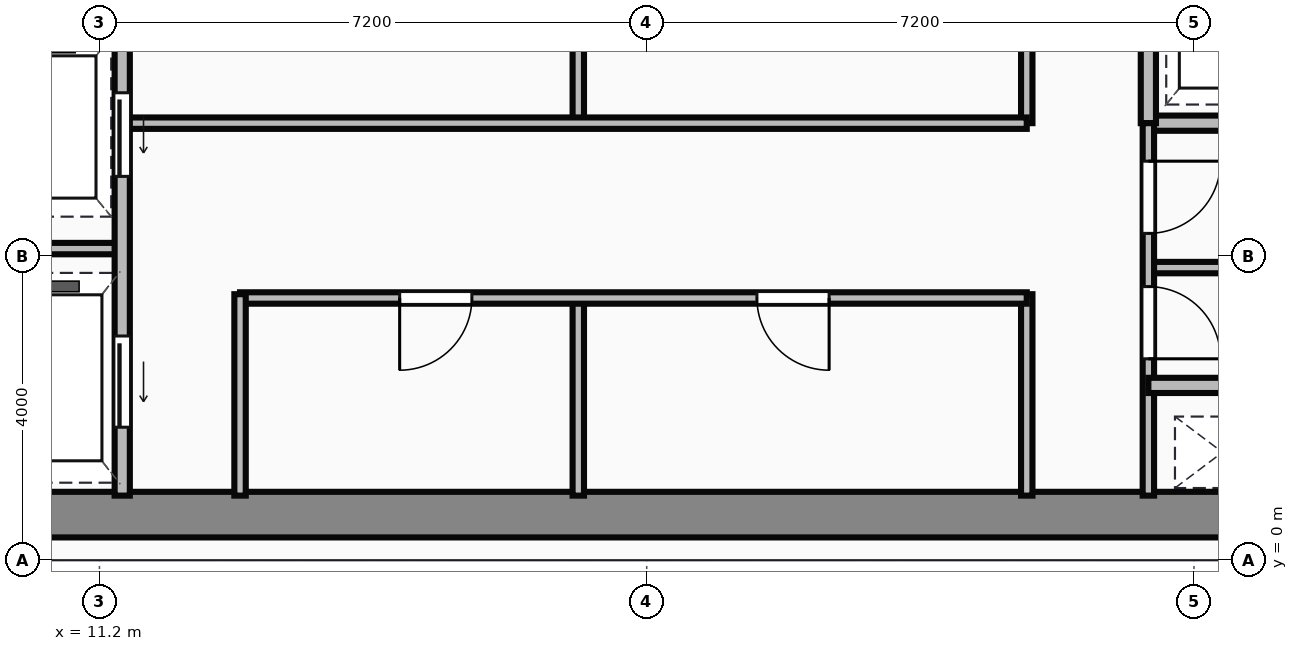
"""IFC4 building model, lengths in metres.
Left out: names, types, materials, properties, quantities, classifications, styles, units other than length and angle.
Written with IfcOpenShell. Run it as: python <this file> out.ifc"""

import sys

from ifc_helpers import new_model, si_unit, direction, frame, frame_2d, origin, place, context, subcontext, project, spatial, rectangle, extrude, source, transform, mapped, element, fill, save


model = new_model("IFC4")
c1 = context("Model", 3, precision=1e-05, world=origin(), true_north=direction((0.0, 1.0)))
c2 = subcontext(c1, "Body", "Model", "MODEL_VIEW")
j1 = project(units=[si_unit("LENGTHUNIT", "METRE"), si_unit("PLANEANGLEUNIT", "RADIAN")], contexts=[c1])
p1 = place(None, origin())
s1 = spatial("IfcSite", under=j1, at=p1, CompositionType="ELEMENT")
p2 = place(p1, origin())
s2 = spatial("IfcBuilding", under=s1, at=p2, CompositionType="ELEMENT")
p3 = place(p2, frame((0.0, 0.0, 266.1)))
s3 = spatial("IfcBuildingStorey", under=s2, at=p3, CompositionType="ELEMENT", Elevation=266.1)
m1 = source(origin(), c2, "Body", "SweptSolid", [
    extrude(rectangle(XDim=29.5, YDim=0.6, at=frame_2d((14.75, 0.0))), origin(), (0.0, 0.0, 1.0), 3.65),
])
p4 = place(p3, frame((4.5, 0.6, 0.0), z_axis=(0.0, 0.0, 1.0), x_axis=(1.0, 0.0, 0.0)))
e1 = element("IfcWall", 1, at=p4, inside=s3, PredefinedType="SHEAR", context=c2, shape_type="MappedRepresentation", body=[
    mapped(m1, transform((0.0, 0.0, 0.0))),
])
m2 = source(origin(), c2, "Body", "SweptSolid", [
    extrude(rectangle(XDim=9.6, YDim=0.2, at=frame_2d((4.8, 0.0))), origin(), (0.0, 0.0, 1.0), 3.4),
])
p5 = place(p3, frame((11.5, 0.85, 0.0), z_axis=(0.0, 0.0, 1.0), x_axis=(0.0, 1.0, 0.0)))
e2 = element("IfcWall", 2, at=p5, inside=s3, PredefinedType="PARTITIONING", context=c2, shape_type="MappedRepresentation", body=[
    mapped(m2, transform((0.0, 0.0, 0.0))),
])
p6 = place(p5, frame((4.2, 0.0, 0.0)))
e3 = element("IfcOpeningElement", 3, at=p6, cuts=e2, PredefinedType="OPENING", context=c2, shape_type="SweptSolid", body=[
    extrude(rectangle(XDim=1.1, YDim=2.15, at=frame_2d((0.55, 1.075))), frame((0.0, 0.11, 0.0), z_axis=(0.0, -1.0, 0.0), x_axis=(1.0, 0.0, 0.0)), (0.0, 0.0, 1.0), 0.22),
])
p7 = place(p5, frame((0.9, 0.0, 0.0)))
e4 = element("IfcOpeningElement", 4, at=p7, cuts=e2, PredefinedType="OPENING", context=c2, shape_type="SweptSolid", body=[
    extrude(rectangle(XDim=1.2, YDim=2.15, at=frame_2d((0.6, 1.075))), frame((0.0, 0.11, 0.0), z_axis=(0.0, -1.0, 0.0), x_axis=(1.0, 0.0, 0.0)), (0.0, 0.0, 1.0), 0.22),
])
m3 = source(origin(), c2, "Body", "SweptSolid", [
    extrude(rectangle(XDim=2.4, YDim=0.15, at=frame_2d((1.2, 0.0))), origin(), (0.0, 0.0, 1.0), 3.4),
])
p8 = place(p3, frame((9.1, 4.1, 0.0), z_axis=(0.0, 0.0, 1.0), x_axis=(1.0, 0.0, 0.0)))
e5 = element("IfcWall", 5, at=p8, inside=s3, PredefinedType="PARTITIONING", context=c2, shape_type="MappedRepresentation", body=[
    mapped(m3, transform((0.0, 0.0, 0.0))),
])
m4 = source(origin(), c2, "Body", "SweptSolid", [
    extrude(rectangle(XDim=2.65, YDim=0.15, at=frame_2d((1.325, 0.0))), origin(), (0.0, 0.0, 1.0), 3.4),
])
p9 = place(p3, frame((13.05, 0.85, 0.0), z_axis=(0.0, 0.0, 1.0), x_axis=(0.0, 1.0, 0.0)))
e6 = element("IfcWall", 6, at=p9, inside=s3, PredefinedType="PARTITIONING", context=c2, shape_type="MappedRepresentation", body=[
    mapped(m4, transform((0.0, 0.0, 0.0))),
])
m5 = source(origin(), c2, "Body", "SweptSolid", [
    extrude(rectangle(XDim=10.35, YDim=0.15, at=frame_2d((5.175, 0.0))), origin(), (0.0, 0.0, 1.0), 3.4),
])
p10 = place(p3, frame((13.05, 3.45, 0.0), z_axis=(0.0, 0.0, 1.0), x_axis=(1.0, 0.0, 0.0)))
e7 = element("IfcWall", 7, at=p10, inside=s3, PredefinedType="PARTITIONING", context=c2, shape_type="MappedRepresentation", body=[
    mapped(m5, transform((0.0, 0.0, 0.0))),
])
p11 = place(p10, frame((2.1, 0.0, 0.0)))
e8 = element("IfcOpeningElement", 8, at=p11, cuts=e7, PredefinedType="OPENING", context=c2, shape_type="SweptSolid", body=[
    extrude(rectangle(XDim=0.95, YDim=2.15, at=frame_2d((0.475, 1.075))), frame((0.0, 0.085, 0.0), z_axis=(0.0, -1.0, 0.0), x_axis=(1.0, 0.0, 0.0)), (0.0, 0.0, 1.0), 0.17),
])
p12 = place(p10, frame((6.8, 0.0, 0.0)))
e9 = element("IfcOpeningElement", 9, at=p12, cuts=e7, PredefinedType="OPENING", context=c2, shape_type="SweptSolid", body=[
    extrude(rectangle(XDim=0.95, YDim=2.15, at=frame_2d((0.475, 1.075))), frame((0.0, 0.085, 0.0), z_axis=(0.0, -1.0, 0.0), x_axis=(1.0, 0.0, 0.0)), (0.0, 0.0, 1.0), 0.17),
])
p13 = place(p3, frame((23.4, 0.85, 0.0), z_axis=(0.0, 0.0, 1.0), x_axis=(0.0, 1.0, 0.0)))
e10 = element("IfcWall", 10, at=p13, inside=s3, PredefinedType="PARTITIONING", context=c2, shape_type="MappedRepresentation", body=[
    mapped(m4, transform((0.0, 0.0, 0.0))),
])
m6 = source(origin(), c2, "Body", "SweptSolid", [
    extrude(rectangle(XDim=2.6, YDim=0.15, at=frame_2d((1.3, 0.0))), origin(), (0.0, 0.0, 1.0), 3.4),
])
p14 = place(p3, frame((17.5, 0.85, 0.0), z_axis=(0.0, 0.0, 1.0), x_axis=(0.0, 1.0, 0.0)))
e11 = element("IfcWall", 11, at=p14, inside=s3, PredefinedType="PARTITIONING", context=c2, shape_type="MappedRepresentation", body=[
    mapped(m6, transform((0.0, 0.0, 0.0))),
])
m7 = source(origin(), c2, "Body", "SweptSolid", [
    extrude(rectangle(XDim=11.85, YDim=0.15, at=frame_2d((5.925, 0.0))), origin(), (0.0, 0.0, 1.0), 3.4),
])
p15 = place(p3, frame((11.55, 5.75, 0.0), z_axis=(0.0, 0.0, 1.0), x_axis=(1.0, 0.0, 0.0)))
e12 = element("IfcWall", 12, at=p15, inside=s3, PredefinedType="PARTITIONING", context=c2, shape_type="MappedRepresentation", body=[
    mapped(m7, transform((0.0, 0.0, 0.0))),
])
m8 = source(origin(), c2, "Body", "SweptSolid", [
    extrude(rectangle(XDim=2.6, YDim=0.15, at=frame_2d((1.3, 0.0))), origin(), (0.0, 0.0, 1.0), 3.4),
])
p16 = place(p3, frame((23.4, 5.75, 0.0), z_axis=(0.0, 0.0, 1.0), x_axis=(0.0, 1.0, 0.0)))
e13 = element("IfcWall", 13, at=p16, inside=s3, PredefinedType="PARTITIONING", context=c2, shape_type="MappedRepresentation", body=[
    mapped(m8, transform((0.0, 0.0, 0.0))),
])
m9 = source(origin(), c2, "Body", "SweptSolid", [
    extrude(rectangle(XDim=2.5, YDim=0.15, at=frame_2d((1.25, 0.0))), origin(), (0.0, 0.0, 1.0), 3.4),
])
p17 = place(p3, frame((17.5, 5.8, 0.0), z_axis=(0.0, 0.0, 1.0), x_axis=(0.0, 1.0, 0.0)))
e14 = element("IfcWall", 14, at=p17, inside=s3, PredefinedType="PARTITIONING", context=c2, shape_type="MappedRepresentation", body=[
    mapped(m9, transform((0.0, 0.0, 0.0))),
])
m10 = source(origin(), c2, "Body", "SweptSolid", [
    extrude(rectangle(XDim=4.55, YDim=0.2, at=frame_2d((2.275, 0.0))), origin(), (0.0, 0.0, 1.0), 3.4),
])
p18 = place(p3, frame((25.0, 5.75, 0.0), z_axis=(0.0, 0.0, 1.0), x_axis=(1.0, 0.0, 0.0)))
e15 = element("IfcWall", 15, at=p18, inside=s3, PredefinedType="PARTITIONING", context=c2, shape_type="MappedRepresentation", body=[
    mapped(m10, transform((0.0, 0.0, 0.0))),
])
m11 = source(origin(), c2, "Body", "SweptSolid", [
    extrude(rectangle(XDim=2.6, YDim=0.2, at=frame_2d((1.3, 0.0))), origin(), (0.0, 0.0, 1.0), 3.4),
])
p19 = place(p3, frame((25.0, 5.75, 0.0), z_axis=(0.0, 0.0, 1.0), x_axis=(0.0, 1.0, 0.0)))
e16 = element("IfcWall", 16, at=p19, inside=s3, PredefinedType="PARTITIONING", context=c2, shape_type="MappedRepresentation", body=[
    mapped(m11, transform((0.0, 0.0, 0.0))),
])
m12 = source(origin(), c2, "Body", "SweptSolid", [
    extrude(rectangle(XDim=4.9, YDim=0.15, at=frame_2d((2.45, 0.0))), origin(), (0.0, 0.0, 1.0), 3.4),
])
p20 = place(p3, frame((25.0, 0.85, 0.0), z_axis=(0.0, 0.0, 1.0), x_axis=(0.0, 1.0, 0.0)))
e17 = element("IfcWall", 17, at=p20, inside=s3, PredefinedType="PARTITIONING", context=c2, shape_type="MappedRepresentation", body=[
    mapped(m12, transform((0.0, 0.0, 0.0))),
])
p21 = place(p20, frame((1.8, 0.0, 0.0)))
e18 = element("IfcOpeningElement", 18, at=p21, cuts=e17, PredefinedType="OPENING", context=c2, shape_type="SweptSolid", body=[
    extrude(rectangle(XDim=0.95, YDim=2.15, at=frame_2d((0.475, 1.075))), frame((0.0, 0.085, 0.0), z_axis=(0.0, -1.0, 0.0), x_axis=(1.0, 0.0, 0.0)), (0.0, 0.0, 1.0), 0.17),
])
p22 = place(p20, frame((3.45, 0.0, 0.0)))
e19 = element("IfcOpeningElement", 19, at=p22, cuts=e17, PredefinedType="OPENING", context=c2, shape_type="SweptSolid", body=[
    extrude(rectangle(XDim=0.95, YDim=2.15, at=frame_2d((0.475, 1.075))), frame((0.0, 0.085, 0.0), z_axis=(0.0, -1.0, 0.0), x_axis=(1.0, 0.0, 0.0)), (0.0, 0.0, 1.0), 0.17),
])
m13 = source(origin(), c2, "Body", "SweptSolid", [
    extrude(rectangle(XDim=2.4, YDim=0.2, at=frame_2d((1.2, 0.0))), origin(), (0.0, 0.0, 1.0), 3.4),
])
p23 = place(p3, frame((25.0, 2.3, 0.0), z_axis=(0.0, 0.0, 1.0), x_axis=(1.0, 0.0, 0.0)))
e20 = element("IfcWall", 20, at=p23, inside=s3, PredefinedType="PARTITIONING", context=c2, shape_type="MappedRepresentation", body=[
    mapped(m13, transform((0.0, 0.0, 0.0))),
])
m14 = source(origin(), c2, "Body", "SweptSolid", [
    extrude(rectangle(XDim=4.55, YDim=0.15, at=frame_2d((2.275, 0.0))), origin(), (0.0, 0.0, 1.0), 3.4),
])
p24 = place(p3, frame((25.0, 3.85, 0.0), z_axis=(0.0, 0.0, 1.0), x_axis=(1.0, 0.0, 0.0)))
e21 = element("IfcWall", 21, at=p24, inside=s3, PredefinedType="PARTITIONING", context=c2, shape_type="MappedRepresentation", body=[
    mapped(m14, transform((0.0, 0.0, 0.0))),
])
m15 = source(origin(), c2, "Body", "SweptSolid", [
    extrude(rectangle(XDim=1.1, YDim=2.15, at=frame_2d((0.55, 1.075))), frame((0.0, 0.025, 0.0), z_axis=(0.0, -1.0, 0.0), x_axis=(1.0, 0.0, 0.0)), (0.0, 0.0, 1.0), 0.05),
])
p25 = place(p6, frame((1.1, 0.0, 0.0), z_axis=(0.0, 0.0, 1.0), x_axis=(-1.0, 0.0, 0.0)))
e22 = element("IfcDoor", 22, at=p25, inside=s3, OperationType="SLIDING_TO_LEFT", PredefinedType="DOOR", context=c2, shape_type="MappedRepresentation", body=[
    mapped(m15, transform((0.0, 0.0, 0.0))),
])
fill(e3, e22)
m16 = source(origin(), c2, "Body", "SweptSolid", [
    extrude(rectangle(XDim=1.2, YDim=2.15, at=frame_2d((0.6, 1.075))), frame((0.0, 0.025, 0.0), z_axis=(0.0, -1.0, 0.0), x_axis=(1.0, 0.0, 0.0)), (0.0, 0.0, 1.0), 0.05),
])
p26 = place(p7, frame((1.2, 0.0, 0.0), z_axis=(0.0, 0.0, 1.0), x_axis=(-1.0, 0.0, 0.0)))
e23 = element("IfcDoor", 23, at=p26, inside=s3, OperationType="SLIDING_TO_LEFT", PredefinedType="DOOR", context=c2, shape_type="MappedRepresentation", body=[
    mapped(m16, transform((0.0, 0.0, 0.0))),
])
fill(e4, e23)
m17 = source(origin(), c2, "Body", "SweptSolid", [
    extrude(rectangle(XDim=0.95, YDim=2.15, at=frame_2d((0.475, 1.075))), frame((0.0, 0.025, 0.0), z_axis=(0.0, -1.0, 0.0), x_axis=(1.0, 0.0, 0.0)), (0.0, 0.0, 1.0), 0.05),
])
p27 = place(p11, origin())
e24 = element("IfcDoor", 24, at=p27, inside=s3, OperationType="SINGLE_SWING_LEFT", PredefinedType="DOOR", context=c2, shape_type="MappedRepresentation", body=[
    mapped(m17, transform((0.0, 0.0, 0.0))),
])
fill(e8, e24)
p28 = place(p12, origin())
e25 = element("IfcDoor", 25, at=p28, inside=s3, OperationType="SINGLE_SWING_RIGHT", PredefinedType="DOOR", context=c2, shape_type="MappedRepresentation", body=[
    mapped(m17, transform((0.0, 0.0, 0.0))),
])
fill(e9, e25)
p29 = place(p21, origin())
e26 = element("IfcDoor", 26, at=p29, inside=s3, OperationType="SINGLE_SWING_LEFT", PredefinedType="DOOR", context=c2, shape_type="MappedRepresentation", body=[
    mapped(m17, transform((0.0, 0.0, 0.0))),
])
fill(e18, e26)
p30 = place(p22, origin())
e27 = element("IfcDoor", 27, at=p30, inside=s3, OperationType="SINGLE_SWING_RIGHT", PredefinedType="DOOR", context=c2, shape_type="MappedRepresentation", body=[
    mapped(m17, transform((0.0, 0.0, 0.0))),
])
fill(e19, e27)
save(model, sys.argv[1])
